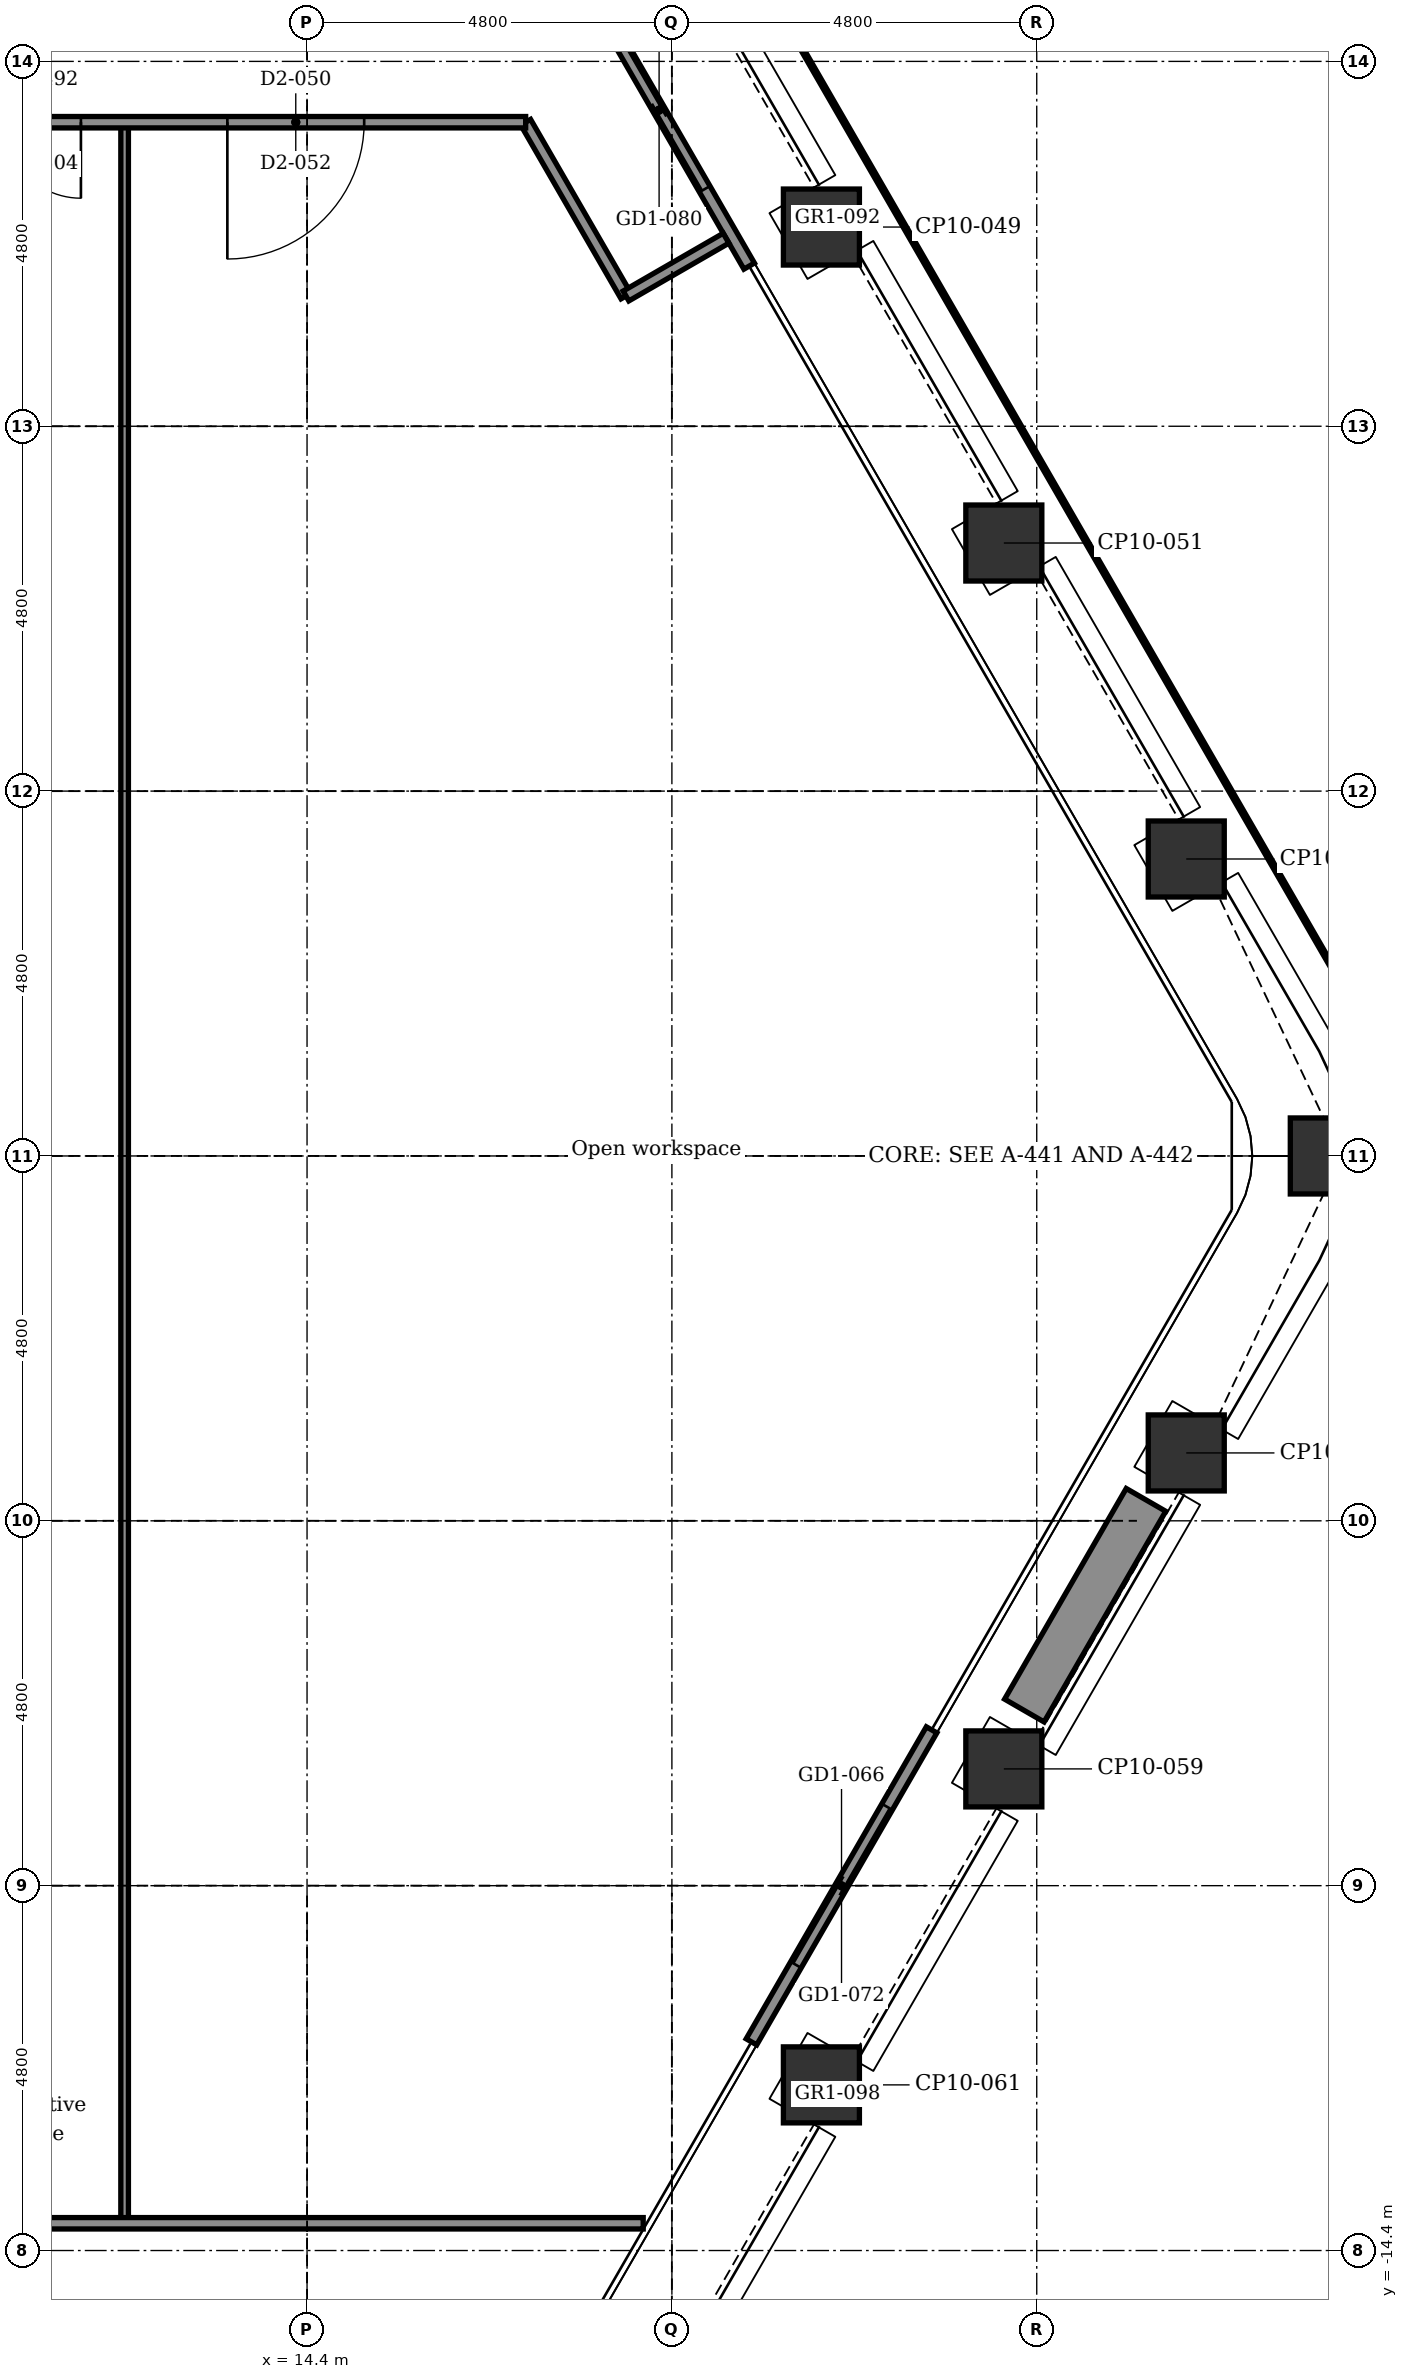
"""IFC4 building model, lengths in metres.
Left out: names, types, materials, properties, quantities, classifications, styles, units other than length and angle.
Written with IfcOpenShell. Run it as: python <this file> out.ifc"""

import sys

from ifc_helpers import new_model, si_unit, direction, frame, frame_2d, origin, origin_2d, place, context, subcontext, project, spatial, rectangle, extrude, element, fill, save


model = new_model("IFC4")
c1 = context("Model", 3, precision=1e-05, world=origin(), true_north=direction((0.0, 1.0)))
c2 = subcontext(c1, "Body", "Model", "MODEL_VIEW")
j1 = project(units=[si_unit("LENGTHUNIT", "METRE"), si_unit("PLANEANGLEUNIT", "RADIAN")], contexts=[c1])
p1 = place(None, origin())
s1 = spatial("IfcSite", under=j1, at=p1, CompositionType="ELEMENT")
p2 = place(p1, origin())
s2 = spatial("IfcBuilding", under=s1, at=p2, CompositionType="ELEMENT")
p3 = place(p2, frame((0.0, 0.0, 170.0)))
s3 = spatial("IfcBuildingStorey", under=s2, at=p3, CompositionType="ELEMENT", Elevation=170.0)
for number, where, z_axis, x_axis in (
    (1, (21.167, 12.221, -0.15), (0.0, 0.0, 1.0), (0.866, 0.5, 0.0)),
    (2, (23.567, 8.064, -0.15), (0.0, 0.0, 1.0), (0.866, 0.5, 0.0)),
    (3, (25.967, 3.907, -0.15), (0.0, 0.0, 1.0), (0.866, 0.5, 0.0)),
    (4, (27.836, 0.0, -0.15), (0.0, 0.0, 1.0), (1.0, 0.0, 0.0)),
    (5, (25.967, -3.907, -0.15), (0.0, 0.0, 1.0), (0.5, 0.866, 0.0)),
    (6, (23.567, -8.064, -0.15), (0.0, 0.0, 1.0), (0.5, 0.866, 0.0)),
    (7, (21.167, -12.221, -0.15), (0.0, 0.0, 1.0), (0.5, 0.866, 0.0)),
):
    element("IfcColumn", number, at=place(p3, frame(where, z_axis=z_axis, x_axis=x_axis)), inside=s3, PredefinedType="COLUMN", context=c2, shape_type="SweptSolid", body=[
        extrude(rectangle(XDim=1.0, YDim=1.0, at=origin_2d()), origin(), (0.0, 0.0, 1.0), 3.9),
    ])
p4 = place(p3, frame((17.847, 15.812, 0.0), z_axis=(0.0, 0.0, 1.0), x_axis=(0.5000167099, -0.866015756104, 0.0)))
e8 = element("IfcWall", 8, at=p4, inside=s3, PredefinedType="PARTITIONING", context=c2, shape_type="SweptSolid", body=[
    extrude(rectangle(XDim=4.74, YDim=0.16, at=frame_2d((2.37, 0.0))), origin(), (0.0, 0.0, 1.0), 3.75),
])
p5 = place(p4, frame((1.17, 0.0, 0.0)))
e9 = element("IfcOpeningElement", 9, at=p5, cuts=e8, PredefinedType="OPENING", context=c2, shape_type="SweptSolid", body=[
    extrude(rectangle(XDim=2.4, YDim=2.4, at=frame_2d((1.2, 1.2))), frame((0.0, 0.09, 0.0), z_axis=(0.0, -1.0, 0.0), x_axis=(1.0, 0.0, 0.0)), (0.0, 0.0, 1.0), 0.18),
])
p6 = place(p3, frame((22.617, -7.55, 0.0), z_axis=(0.0, 0.0, 1.0), x_axis=(-0.5000167099, -0.866015756104, 0.0)))
e10 = element("IfcWall", 10, at=p6, inside=s3, PredefinedType="PARTITIONING", context=c2, shape_type="SweptSolid", body=[
    extrude(rectangle(XDim=4.74, YDim=0.16, at=frame_2d((2.37, 0.0))), origin(), (0.0, 0.0, 1.0), 3.75),
])
p7 = place(p6, frame((1.17, 0.0, 0.0)))
e11 = element("IfcOpeningElement", 11, at=p7, cuts=e10, PredefinedType="OPENING", context=c2, shape_type="SweptSolid", body=[
    extrude(rectangle(XDim=2.4, YDim=2.4, at=frame_2d((1.2, 1.2))), frame((0.0, 0.09, 0.0), z_axis=(0.0, -1.0, 0.0), x_axis=(1.0, 0.0, 0.0)), (0.0, 0.0, 1.0), 0.18),
])
p8 = place(p3, frame((25.437, -4.525, 0.0), z_axis=(0.0, 0.0, 1.0), x_axis=(-0.499938187974, -0.866061088033, 0.0)))
e12 = element("IfcWall", 12, at=p8, inside=s3, PredefinedType="USERDEFINED", context=c2, shape_type="SweptSolid", body=[
    extrude(rectangle(XDim=3.2, YDim=0.6, at=frame_2d((1.6, 0.0))), origin(), (0.0, 0.0, 1.0), 0.7),
])
p9 = place(p3, frame((12.0, -14.042, 0.0), z_axis=(0.0, 0.0, 1.0), x_axis=(0.0, 1.0, 0.0)))
e13 = element("IfcWall", 13, at=p9, inside=s3, PredefinedType="PARTITIONING", context=c2, shape_type="SweptSolid", body=[
    extrude(rectangle(XDim=27.642, YDim=0.1, at=frame_2d((13.821, 0.0))), origin(), (0.0, 0.0, 1.0), 3.75),
])
p10 = place(p3, frame((17.276, 13.6, 0.0), z_axis=(0.0, 0.0, 1.0), x_axis=(0.499938597367, -0.866060851709, 0.0)))
e14 = element("IfcWall", 14, at=p10, inside=s3, PredefinedType="PARTITIONING", context=c2, shape_type="SweptSolid", body=[
    extrude(rectangle(XDim=2.64, YDim=0.15, at=frame_2d((1.32, 0.0))), origin(), (0.0, 0.0, 1.0), 3.75),
])
p11 = place(p3, frame((18.596, 11.314, 0.0), z_axis=(0.0, 0.0, 1.0), x_axis=(0.866030456496, 0.499991248344, 0.0)))
e15 = element("IfcWall", 15, at=p11, inside=s3, PredefinedType="PARTITIONING", context=c2, shape_type="SweptSolid", body=[
    extrude(rectangle(XDim=1.52, YDim=0.15, at=frame_2d((0.76, 0.0))), origin(), (0.0, 0.0, 1.0), 3.75),
])
p12 = place(p3, frame((5.4, -14.042, 0.0), z_axis=(0.0, 0.0, 1.0), x_axis=(1.0, 0.0, 0.0)))
e16 = element("IfcWall", 16, at=p12, inside=s3, PredefinedType="PARTITIONING", context=c2, shape_type="SweptSolid", body=[
    extrude(rectangle(XDim=13.423, YDim=0.15, at=frame_2d((6.711, 0.0))), origin(), (0.0, 0.0, 1.0), 3.75),
])
p13 = place(p12, frame((1.65, 0.0, 0.0)))
e17 = element("IfcOpeningElement", 17, at=p13, cuts=e16, PredefinedType="OPENING", context=c2, shape_type="SweptSolid", body=[
    extrude(rectangle(XDim=0.9, YDim=2.1, at=frame_2d((0.45, 1.05))), frame((0.0, 0.085, 0.0), z_axis=(0.0, -1.0, 0.0), x_axis=(1.0, 0.0, 0.0)), (0.0, 0.0, 1.0), 0.17),
])
p14 = place(p3, frame((-1.8, 13.6, 0.0), z_axis=(0.0, 0.0, 1.0), x_axis=(1.0, 0.0, 0.0)))
e18 = element("IfcWall", 18, at=p14, inside=s3, PredefinedType="PARTITIONING", context=c2, shape_type="SweptSolid", body=[
    extrude(rectangle(XDim=19.076, YDim=0.15, at=frame_2d((9.538, 0.0))), origin(), (0.0, 0.0, 1.0), 3.75),
])
p15 = place(p14, frame((2.8, 0.0, 0.0)))
e19 = element("IfcOpeningElement", 19, at=p15, cuts=e18, PredefinedType="OPENING", context=c2, shape_type="SweptSolid", body=[
    extrude(rectangle(XDim=1.0, YDim=2.1, at=frame_2d((0.5, 1.05))), frame((0.0, 0.085, 0.0), z_axis=(0.0, -1.0, 0.0), x_axis=(1.0, 0.0, 0.0)), (0.0, 0.0, 1.0), 0.17),
])
p16 = place(p14, frame((8.065, 0.0, 0.0)))
e20 = element("IfcOpeningElement", 20, at=p16, cuts=e18, PredefinedType="OPENING", context=c2, shape_type="SweptSolid", body=[
    extrude(rectangle(XDim=1.0, YDim=2.1, at=frame_2d((0.5, 1.05))), frame((0.0, 0.085, 0.0), z_axis=(0.0, -1.0, 0.0), x_axis=(1.0, 0.0, 0.0)), (0.0, 0.0, 1.0), 0.17),
])
p17 = place(p14, frame((12.225, 0.0, 0.0)))
e21 = element("IfcOpeningElement", 21, at=p17, cuts=e18, PredefinedType="OPENING", context=c2, shape_type="SweptSolid", body=[
    extrude(rectangle(XDim=1.0, YDim=2.1, at=frame_2d((0.5, 1.05))), frame((0.0, 0.085, 0.0), z_axis=(0.0, -1.0, 0.0), x_axis=(1.0, 0.0, 0.0)), (0.0, 0.0, 1.0), 0.17),
])
p18 = place(p14, frame((15.152, 0.0, 0.0)))
e22 = element("IfcOpeningElement", 22, at=p18, cuts=e18, PredefinedType="OPENING", context=c2, shape_type="SweptSolid", body=[
    extrude(rectangle(XDim=1.8, YDim=2.1, at=frame_2d((0.9, 1.05))), frame((0.0, 0.085, 0.0), z_axis=(0.0, -1.0, 0.0), x_axis=(1.0, 0.0, 0.0)), (0.0, 0.0, 1.0), 0.17),
])
p19 = place(p5, origin())
e23 = element("IfcDoor", 23, at=p19, inside=s3, OperationType="DOUBLE_DOOR_SLIDING", PredefinedType="DOOR", context=c2, shape_type="SweptSolid", body=[
    extrude(rectangle(XDim=2.4, YDim=2.4, at=frame_2d((1.2, 1.2))), frame((0.0, 0.025, 0.0), z_axis=(0.0, -1.0, 0.0), x_axis=(1.0, 0.0, 0.0)), (0.0, 0.0, 1.0), 0.05),
])
fill(e9, e23)
p20 = place(p7, origin())
e24 = element("IfcDoor", 24, at=p20, inside=s3, OperationType="DOUBLE_DOOR_SLIDING", PredefinedType="DOOR", context=c2, shape_type="SweptSolid", body=[
    extrude(rectangle(XDim=2.4, YDim=2.4, at=frame_2d((1.2, 1.2))), frame((0.0, 0.025, 0.0), z_axis=(0.0, -1.0, 0.0), x_axis=(1.0, 0.0, 0.0)), (0.0, 0.0, 1.0), 0.05),
])
fill(e11, e24)
p21 = place(p17, frame((1.0, 0.0, 0.0), z_axis=(0.0, 0.0, 1.0), x_axis=(-1.0, 0.0, 0.0)))
e25 = element("IfcDoor", 25, at=p21, inside=s3, OperationType="SINGLE_SWING_RIGHT", PredefinedType="DOOR", context=c2, shape_type="SweptSolid", body=[
    extrude(rectangle(XDim=1.0, YDim=2.1, at=frame_2d((0.5, 1.05))), frame((0.0, 0.025, 0.0), z_axis=(0.0, -1.0, 0.0), x_axis=(1.0, 0.0, 0.0)), (0.0, 0.0, 1.0), 0.05),
])
fill(e21, e25)
p22 = place(p18, frame((1.8, 0.0, 0.0), z_axis=(0.0, 0.0, 1.0), x_axis=(-1.0, 0.0, 0.0)))
e26 = element("IfcDoor", 26, at=p22, inside=s3, OperationType="SINGLE_SWING_LEFT", PredefinedType="DOOR", context=c2, shape_type="SweptSolid", body=[
    extrude(rectangle(XDim=1.8, YDim=2.1, at=frame_2d((0.9, 1.05))), frame((0.0, 0.025, 0.0), z_axis=(0.0, -1.0, 0.0), x_axis=(1.0, 0.0, 0.0)), (0.0, 0.0, 1.0), 0.05),
])
fill(e22, e26)
save(model, sys.argv[1])
